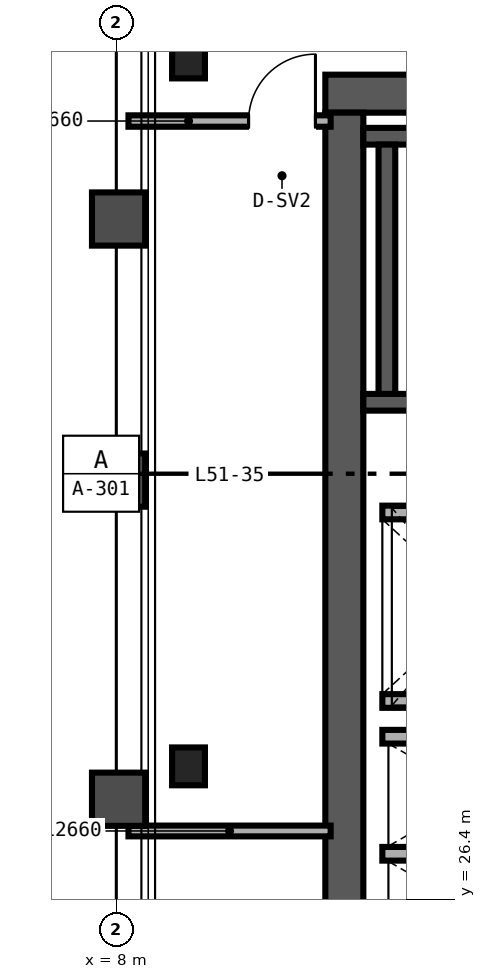
"""IFC4 building model, lengths in metres.
Left out: names, types, materials, properties, quantities, classifications, styles, units other than length and angle.
Written with IfcOpenShell. Run it as: python <this file> out.ifc"""

import sys

from ifc_helpers import new_model, si_unit, direction, frame, frame_2d, origin, origin_2d, place, context, subcontext, project, spatial, rectangle, i_section, extrude, source, transform, mapped, element, fill, save


model = new_model("IFC4")
c1 = context("Model", 3, precision=1e-05, world=origin(), true_north=direction((0.0, 1.0)))
c2 = subcontext(c1, "Body", "Model", "MODEL_VIEW")
j1 = project(units=[si_unit("LENGTHUNIT", "METRE"), si_unit("PLANEANGLEUNIT", "RADIAN")], contexts=[c1])
p1 = place(None, origin())
s1 = spatial("IfcSite", under=j1, at=p1, CompositionType="ELEMENT")
p2 = place(p1, origin())
s2 = spatial("IfcBuilding", under=s1, at=p2, CompositionType="ELEMENT")
p3 = place(p2, frame((0.0, 0.0, 202.8)))
s3 = spatial("IfcBuildingStorey", under=s2, at=p3, CompositionType="ELEMENT", Elevation=202.8)
p4 = place(p3, frame((10.75, 37.0, 0.0), z_axis=(0.0, 0.0, 1.0), x_axis=(1.0, 0.0, 0.0)))
e1 = element("IfcWall", 1, at=p4, inside=s3, PredefinedType="SHEAR", context=c2, shape_type="SweptSolid", body=[
    extrude(rectangle(XDim=12.5, YDim=0.5, at=frame_2d((6.25, 0.0))), origin(), (0.0, 0.0, 1.0), 3.37),
])
p5 = place(p4, frame((8.83, 0.0, 0.0)))
e2 = element("IfcOpeningElement", 2, at=p5, cuts=e1, PredefinedType="OPENING", context=c2, shape_type="SweptSolid", body=[
    extrude(rectangle(XDim=1.0, YDim=2.15, at=frame_2d((0.5, 1.075))), frame((0.0, 0.26, 0.0), z_axis=(0.0, -1.0, 0.0), x_axis=(1.0, 0.0, 0.0)), (0.0, 0.0, 1.0), 0.52),
])
p6 = place(p3, frame((11.0, 15.25, 0.0), z_axis=(0.0, 0.0, 1.0), x_axis=(0.0, 1.0, 0.0)))
e3 = element("IfcWall", 3, at=p6, inside=s3, PredefinedType="SHEAR", context=c2, shape_type="SweptSolid", body=[
    extrude(rectangle(XDim=21.5, YDim=0.5, at=frame_2d((10.75, 0.0))), origin(), (0.0, 0.0, 1.0), 3.37),
])
p7 = place(p3, frame((11.25, 32.94, 0.0), z_axis=(0.0, 0.0, 1.0), x_axis=(1.0, 0.0, 0.0)))
e4 = element("IfcWall", 4, at=p7, inside=s3, PredefinedType="SHEAR", context=c2, shape_type="SweptSolid", body=[
    extrude(rectangle(XDim=8.06, YDim=0.22, at=frame_2d((4.03, 0.0))), origin(), (0.0, 0.0, 1.0), 3.4),
])
p8 = place(p7, frame((0.67, 0.0, 0.0)))
e5 = element("IfcOpeningElement", 5, at=p8, cuts=e4, PredefinedType="OPENING", context=c2, shape_type="SweptSolid", body=[
    extrude(rectangle(XDim=1.05, YDim=2.15, at=frame_2d((0.525, 1.075))), frame((0.0, 0.12, 0.0), z_axis=(0.0, -1.0, 0.0), x_axis=(1.0, 0.0, 0.0)), (0.0, 0.0, 1.0), 0.24),
])
p9 = place(p3, frame((11.25, 36.44, 0.0), z_axis=(0.0, 0.0, 1.0), x_axis=(1.0, 0.0, 0.0)))
e6 = element("IfcWall", 6, at=p9, inside=s3, PredefinedType="SHEAR", context=c2, shape_type="SweptSolid", body=[
    extrude(rectangle(XDim=8.06, YDim=0.22, at=frame_2d((4.03, 0.0))), origin(), (0.0, 0.0, 1.0), 3.4),
])
p10 = place(p3, frame((11.56, 33.05, 0.0), z_axis=(0.0, 0.0, 1.0), x_axis=(0.0, 1.0, 0.0)))
e7 = element("IfcWall", 7, at=p10, inside=s3, PredefinedType="SHEAR", context=c2, shape_type="SweptSolid", body=[
    extrude(rectangle(XDim=3.28, YDim=0.22, at=frame_2d((1.64, 0.0))), origin(), (0.0, 0.0, 1.0), 3.4),
])
m1 = source(origin(), c2, "Body", "SweptSolid", [
    extrude(i_section(OverallWidth=0.432, OverallDepth=0.498, WebThickness=0.056, FlangeThickness=0.089, FilletRadius=0.025, at=origin_2d()), origin(), (0.0, 0.0, 1.0), 3.37),
])
for number, where, z_axis, x_axis in (
    (8, (8.95, 28.15, 0.0), (0.0, 0.0, 1.0), (1.0, 0.0, 0.0)),
    (9, (8.95, 37.45, 0.0), (0.0, 0.0, 1.0), (1.0, 0.0, 0.0)),
):
    element("IfcColumn", number, at=place(p3, frame(where, z_axis=z_axis, x_axis=x_axis)), inside=s3, PredefinedType="COLUMN", context=c2, shape_type="MappedRepresentation", body=[
        mapped(m1, transform((0.0, 0.0, 0.0), scale=1.0)),
    ])
for number, where, z_axis, x_axis in (
    (10, (11.5, 29.01, 0.0), (0.0, 0.0, 1.0), (1.0, 0.0, 0.0)),
    (11, (11.5, 31.49, 0.0), (0.0, 0.0, 1.0), (1.0, 0.0, 0.0)),
):
    element("IfcWall", number, at=place(p3, frame(where, z_axis=z_axis, x_axis=x_axis)), inside=s3, PredefinedType="SOLIDWALL", context=c2, shape_type="SweptSolid", body=[
        extrude(rectangle(XDim=2.5, YDim=0.18, at=frame_2d((1.25, 0.0))), origin(), (0.0, 0.0, 1.0), 3.37),
    ])
for number, where, z_axis, x_axis in (
    (12, (11.5, 27.0, 0.0), (0.0, 0.0, 1.0), (1.0, 0.0, 0.0)),
    (13, (11.5, 28.54, 0.0), (0.0, 0.0, 1.0), (1.0, 0.0, 0.0)),
):
    element("IfcWall", number, at=place(p3, frame(where, z_axis=z_axis, x_axis=x_axis)), inside=s3, PredefinedType="SOLIDWALL", context=c2, shape_type="SweptSolid", body=[
        extrude(rectangle(XDim=2.51, YDim=0.18, at=frame_2d((1.255, 0.0))), origin(), (0.0, 0.0, 1.0), 3.37),
    ])
p11 = place(p3, frame((8.16, 36.64, 0.0), z_axis=(0.0, 0.0, 1.0), x_axis=(1.0, 0.0, 0.0)))
e14 = element("IfcWall", 14, at=p11, inside=s3, PredefinedType="PARTITIONING", context=c2, shape_type="SweptSolid", body=[
    extrude(rectangle(XDim=2.66, YDim=0.15, at=frame_2d((1.33, 0.0))), origin(), (0.0, 0.0, 1.0), 2.753),
])
p12 = place(p11, frame((1.58, 0.0, 0.0)))
e15 = element("IfcOpeningElement", 15, at=p12, cuts=e14, PredefinedType="OPENING", context=c2, shape_type="SweptSolid", body=[
    extrude(rectangle(XDim=0.88, YDim=2.15, at=frame_2d((0.44, 1.075))), frame((0.0, 0.085, 0.0), z_axis=(0.0, -1.0, 0.0), x_axis=(1.0, 0.0, 0.0)), (0.0, 0.0, 1.0), 0.17),
])
p13 = place(p3, frame((8.16, 27.3, 0.0), z_axis=(0.0, 0.0, 1.0), x_axis=(1.0, 0.0, 0.0)))
e16 = element("IfcWall", 16, at=p13, inside=s3, PredefinedType="PARTITIONING", context=c2, shape_type="SweptSolid", body=[
    extrude(rectangle(XDim=2.66, YDim=0.142, at=frame_2d((1.33, 0.0))), origin(), (0.0, 0.0, 1.0), 2.591),
])
m2 = source(origin(), c2, "Body", "SweptSolid", [
    extrude(rectangle(XDim=0.88, YDim=2.15, at=frame_2d((0.44, 1.075))), frame((0.0, 0.025, 0.0), z_axis=(0.0, -1.0, 0.0), x_axis=(1.0, 0.0, 0.0)), (0.0, 0.0, 1.0), 0.05),
])
p14 = place(p12, origin())
e17 = element("IfcDoor", 17, at=p14, inside=s3, OperationType="SINGLE_SWING_RIGHT", PredefinedType="DOOR", context=c2, shape_type="MappedRepresentation", body=[
    mapped(m2, transform((0.0, 0.0, 0.0), scale=1.0)),
])
fill(e15, e17)
save(model, sys.argv[1])
